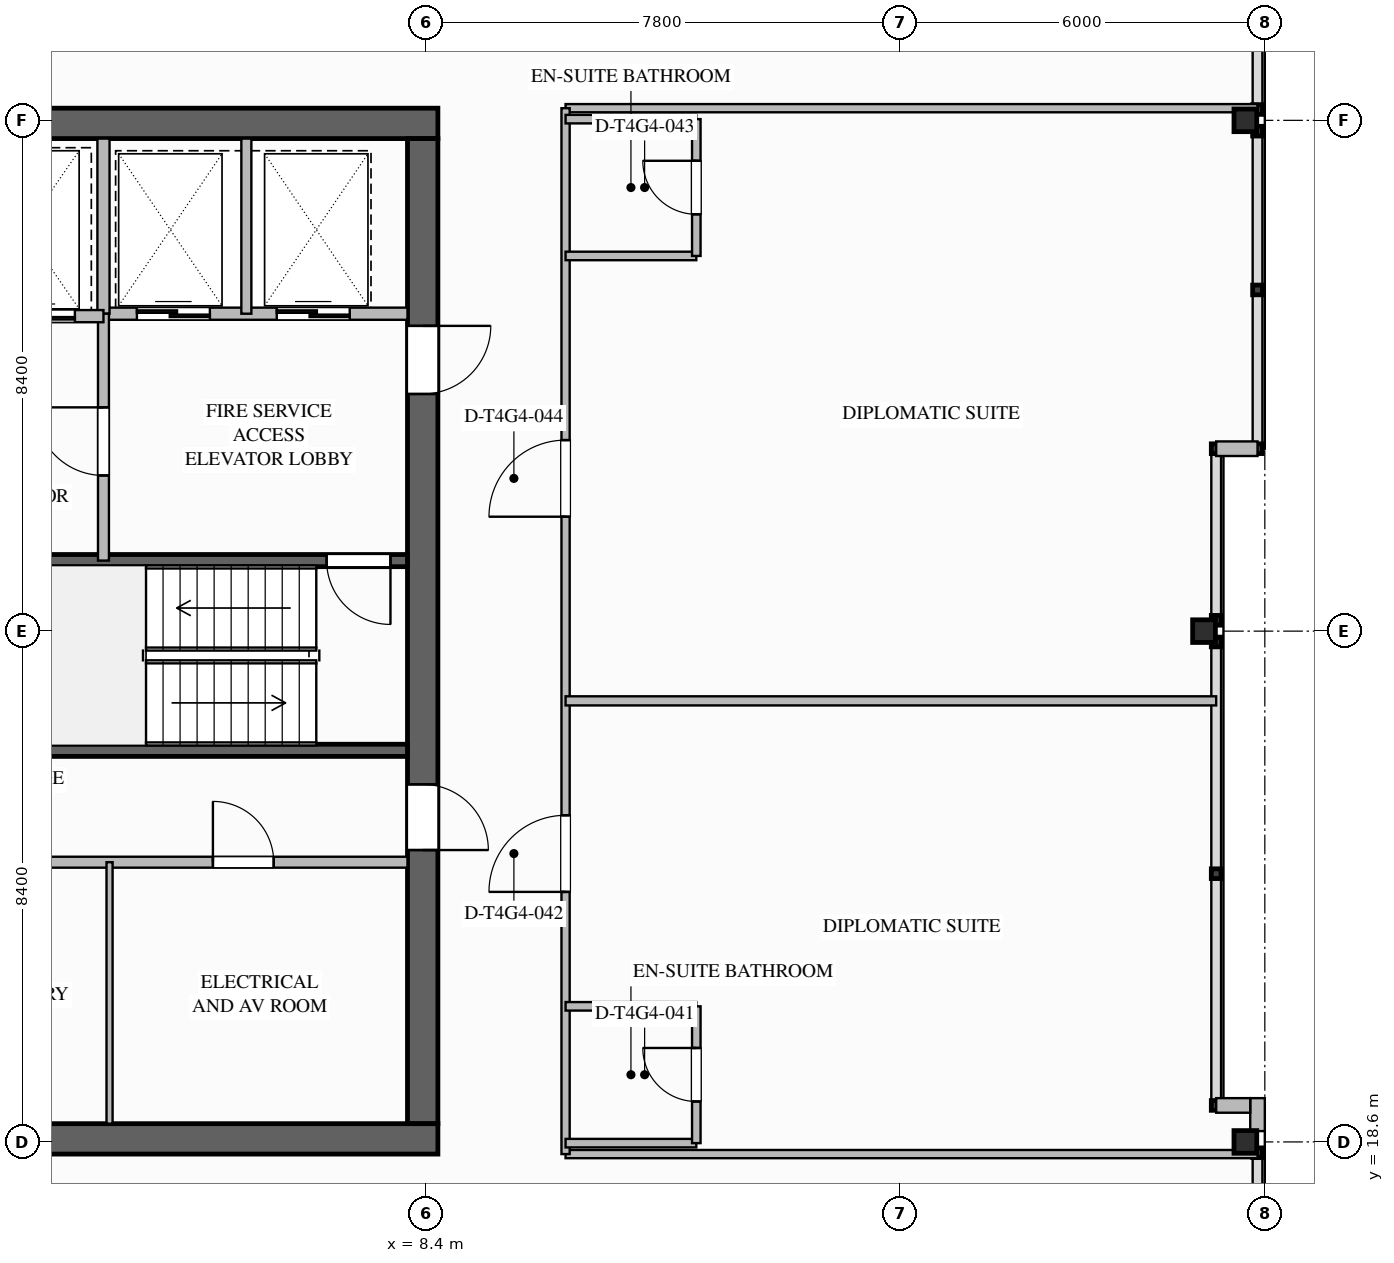
"""IFC4 building model, lengths in metres.
Left out: names, types, materials, properties, quantities, classifications, styles, units other than length and angle.
Written with IfcOpenShell. Run it as: python <this file> out.ifc"""

import sys

from ifc_helpers import new_model, si_unit, direction, frame, frame_2d, origin, origin_2d, place, context, subcontext, project, spatial, rectangle, i_section, extrude, element, fill, save


model = new_model("IFC4")
c1 = context("Model", 3, precision=1e-05, world=origin(), true_north=direction((0.0, 1.0)))
c2 = subcontext(c1, "Body", "Model", "MODEL_VIEW")
j1 = project(units=[si_unit("LENGTHUNIT", "METRE"), si_unit("PLANEANGLEUNIT", "RADIAN")], contexts=[c1])
p1 = place(None, origin())
s1 = spatial("IfcSite", under=j1, at=p1, CompositionType="ELEMENT")
p2 = place(p1, origin())
s2 = spatial("IfcBuilding", under=s1, at=p2, CompositionType="ELEMENT")
p3 = place(p2, frame((0.0, 0.0, 237.5)))
s3 = spatial("IfcBuildingStorey", under=s2, at=p3, CompositionType="ELEMENT", Elevation=237.5)
p4 = place(p3, frame((-8.6, 35.35, 0.0), z_axis=(0.0, 0.0, 1.0), x_axis=(1.0, 0.0, 0.0)))
e1 = element("IfcWall", 1, at=p4, inside=s3, PredefinedType="SHEAR", context=c2, shape_type="SweptSolid", body=[
    extrude(rectangle(XDim=17.2, YDim=0.5, at=frame_2d((8.6, 0.0))), origin(), (0.0, 0.0, 1.0), 3.6),
])
p5 = place(p3, frame((8.35, 35.1, 0.0), z_axis=(0.0, 0.0, 1.0), x_axis=(0.0, -1.0, 0.0)))
e2 = element("IfcWall", 2, at=p5, inside=s3, PredefinedType="SHEAR", context=c2, shape_type="SweptSolid", body=[
    extrude(rectangle(XDim=16.2, YDim=0.5, at=frame_2d((8.1, 0.0))), origin(), (0.0, 0.0, 1.0), 3.6),
])
p6 = place(p5, frame((3.08, 0.0, 0.0)))
e3 = element("IfcOpeningElement", 3, at=p6, cuts=e2, PredefinedType="OPENING", context=c2, shape_type="SweptSolid", body=[
    extrude(rectangle(XDim=1.12, YDim=2.1, at=frame_2d((0.56, 1.05))), frame((0.0, 0.26, 0.0), z_axis=(0.0, -1.0, 0.0), x_axis=(1.0, 0.0, 0.0)), (0.0, 0.0, 1.0), 0.52),
])
p7 = place(p5, frame((10.62, 0.0, 0.0)))
e4 = element("IfcOpeningElement", 4, at=p7, cuts=e2, PredefinedType="OPENING", context=c2, shape_type="SweptSolid", body=[
    extrude(rectangle(XDim=1.08, YDim=2.04, at=frame_2d((0.54, 1.02))), frame((0.0, 0.26, 0.0), z_axis=(0.0, -1.0, 0.0), x_axis=(1.0, 0.0, 0.0)), (0.0, 0.0, 1.0), 0.52),
])
p8 = place(p3, frame((8.6, 18.65, 0.0), z_axis=(0.0, 0.0, 1.0), x_axis=(-1.0, 0.0, 0.0)))
e5 = element("IfcWall", 5, at=p8, inside=s3, PredefinedType="SHEAR", context=c2, shape_type="SweptSolid", body=[
    extrude(rectangle(XDim=17.2, YDim=0.5, at=frame_2d((8.6, 0.0))), origin(), (0.0, 0.0, 1.0), 3.6),
])
for number, where, z_axis, x_axis in (
    (6, (21.88, 18.6, 0.0), (0.0, 0.0, 1.0), (1.0, 0.0, 0.0)),
    (7, (21.2, 27.0, 0.0), (0.0, 0.0, 1.0), (1.0, 0.0, 0.0)),
    (8, (21.88, 35.4, 0.0), (0.0, 0.0, 1.0), (1.0, 0.0, 0.0)),
):
    element("IfcColumn", number, at=place(p3, frame(where, z_axis=z_axis, x_axis=x_axis)), inside=s3, PredefinedType="COLUMN", context=c2, shape_type="SweptSolid", body=[
        extrude(i_section(OverallWidth=0.374, OverallDepth=0.372, WebThickness=0.016, FlangeThickness=0.026, FilletRadius=0.025, at=origin_2d()), origin(), (0.0, 0.0, 1.0), 3.597),
    ])
p9 = place(p3, frame((22.08, 19.32, 0.0), z_axis=(0.0, 0.0, 1.0), x_axis=(0.0, -1.0, 0.0)))
e9 = element("IfcWall", 9, at=p9, inside=s3, PredefinedType="STANDARD", context=c2, shape_type="SweptSolid", body=[
    extrude(rectangle(XDim=0.542, YDim=0.24, at=frame_2d((0.271, 0.0))), origin(), (0.0, 0.0, 1.0), 3.34),
])
p10 = place(p3, frame((22.08, 30.0, 0.0), z_axis=(0.0, 0.0, 1.0), x_axis=(-1.0, 0.0, 0.0)))
e10 = element("IfcWall", 10, at=p10, inside=s3, PredefinedType="STANDARD", context=c2, shape_type="SweptSolid", body=[
    extrude(rectangle(XDim=0.68, YDim=0.24, at=frame_2d((0.34, 0.0))), origin(), (0.0, 0.0, 1.0), 3.34),
])
p11 = place(p3, frame((21.4, 19.2, 0.0), z_axis=(0.0, 0.0, 1.0), x_axis=(1.0, 0.0, 0.0)))
e11 = element("IfcWall", 11, at=p11, inside=s3, PredefinedType="STANDARD", context=c2, shape_type="SweptSolid", body=[
    extrude(rectangle(XDim=0.56, YDim=0.24, at=frame_2d((0.28, 0.0))), origin(), (0.0, 0.0, 1.0), 3.34),
])
p12 = place(p3, frame((0.0, 25.04, 0.0), z_axis=(0.0, 0.0, 1.0), x_axis=(1.0, 0.0, 0.0)))
e12 = element("IfcWall", 12, at=p12, inside=s3, PredefinedType="SOLIDWALL", context=c2, shape_type="SweptSolid", body=[
    extrude(rectangle(XDim=8.1, YDim=0.2, at=frame_2d((4.05, 0.0))), origin(), (0.0, 0.0, 1.0), 3.34),
])
p13 = place(p3, frame((8.1, 28.16, 0.0), z_axis=(0.0, 0.0, 1.0), x_axis=(-1.0, 0.0, 0.0)))
e13 = element("IfcWall", 13, at=p13, inside=s3, PredefinedType="SOLIDWALL", context=c2, shape_type="SweptSolid", body=[
    extrude(rectangle(XDim=8.1, YDim=0.2, at=frame_2d((4.05, 0.0))), origin(), (0.0, 0.0, 1.0), 3.34),
])
p14 = place(p13, frame((0.28, 0.0, 0.0)))
e14 = element("IfcOpeningElement", 14, at=p14, cuts=e13, PredefinedType="OPENING", context=c2, shape_type="SweptSolid", body=[
    extrude(rectangle(XDim=1.05, YDim=2.1, at=frame_2d((0.525, 1.05))), frame((0.0, 0.11, 0.0), z_axis=(0.0, -1.0, 0.0), x_axis=(1.0, 0.0, 0.0)), (0.0, 0.0, 1.0), 0.22),
])
p15 = place(p3, frame((3.1, 32.22, 0.0), z_axis=(0.0, 0.0, 1.0), x_axis=(1.0, 0.0, 0.0)))
e15 = element("IfcWall", 15, at=p15, inside=s3, PredefinedType="SOLIDWALL", context=c2, shape_type="SweptSolid", body=[
    extrude(rectangle(XDim=5.0, YDim=0.2, at=frame_2d((2.5, 0.0))), origin(), (0.0, 0.0, 1.0), 3.34),
])
p16 = place(p15, frame((0.55, 0.0, 0.0)))
e16 = element("IfcOpeningElement", 16, at=p16, cuts=e15, PredefinedType="OPENING", context=c2, shape_type="SweptSolid", body=[
    extrude(rectangle(XDim=1.2, YDim=2.2, at=frame_2d((0.6, 1.1))), frame((0.0, 0.11, 0.0), z_axis=(0.0, -1.0, 0.0), x_axis=(1.0, 0.0, 0.0)), (0.0, 0.0, 1.0), 0.22),
])
p17 = place(p15, frame((2.85, 0.0, 0.0)))
e17 = element("IfcOpeningElement", 17, at=p17, cuts=e15, PredefinedType="OPENING", context=c2, shape_type="SweptSolid", body=[
    extrude(rectangle(XDim=1.2, YDim=2.2, at=frame_2d((0.6, 1.1))), frame((0.0, 0.11, 0.0), z_axis=(0.0, -1.0, 0.0), x_axis=(1.0, 0.0, 0.0)), (0.0, 0.0, 1.0), 0.22),
])
p18 = place(p3, frame((3.1, 32.22, 0.0), z_axis=(0.0, 0.0, 1.0), x_axis=(0.0, 1.0, 0.0)))
e18 = element("IfcWall", 18, at=p18, inside=s3, PredefinedType="SOLIDWALL", context=c2, shape_type="SweptSolid", body=[
    extrude(rectangle(XDim=2.88, YDim=0.2, at=frame_2d((1.44, 0.0))), origin(), (0.0, 0.0, 1.0), 3.34),
])
p19 = place(p3, frame((5.45, 32.22, 0.0), z_axis=(0.0, 0.0, 1.0), x_axis=(0.0, 1.0, 0.0)))
e19 = element("IfcWall", 19, at=p19, inside=s3, PredefinedType="PARTITIONING", context=c2, shape_type="SweptSolid", body=[
    extrude(rectangle(XDim=2.88, YDim=0.165, at=frame_2d((1.44, 0.0))), origin(), (0.0, 0.0, 1.0), 3.34),
])
p20 = place(p3, frame((3.1, 28.16, 0.0), z_axis=(0.0, 0.0, 1.0), x_axis=(0.0, 1.0, 0.0)))
e20 = element("IfcWall", 20, at=p20, inside=s3, PredefinedType="SOLIDWALL", context=c2, shape_type="SweptSolid", body=[
    extrude(rectangle(XDim=4.06, YDim=0.18, at=frame_2d((2.03, 0.0))), origin(), (0.0, 0.0, 1.0), 3.34),
])
p21 = place(p20, frame((1.4, 0.0, 0.0)))
e21 = element("IfcOpeningElement", 21, at=p21, cuts=e20, PredefinedType="OPENING", context=c2, shape_type="SweptSolid", body=[
    extrude(rectangle(XDim=1.12, YDim=2.1, at=frame_2d((0.56, 1.05))), frame((0.0, 0.1, 0.0), z_axis=(0.0, -1.0, 0.0), x_axis=(1.0, 0.0, 0.0)), (0.0, 0.0, 1.0), 0.2),
])
p22 = place(p3, frame((-1.0, 32.18, 0.0), z_axis=(0.0, 0.0, 1.0), x_axis=(1.0, 0.0, 0.0)))
e22 = element("IfcWall", 22, at=p22, inside=s3, PredefinedType="SOLIDWALL", context=c2, shape_type="SweptSolid", body=[
    extrude(rectangle(XDim=4.1, YDim=0.2, at=frame_2d((2.05, 0.0))), origin(), (0.0, 0.0, 1.0), 3.34),
])
p23 = place(p22, frame((0.37, 0.0, 0.0)))
e23 = element("IfcOpeningElement", 23, at=p23, cuts=e22, PredefinedType="OPENING", context=c2, shape_type="SweptSolid", body=[
    extrude(rectangle(XDim=1.3, YDim=2.2, at=frame_2d((0.65, 1.1))), frame((0.0, 0.11, 0.0), z_axis=(0.0, -1.0, 0.0), x_axis=(1.0, 0.0, 0.0)), (0.0, 0.0, 1.0), 0.22),
])
p24 = place(p22, frame((2.33, 0.0, 0.0)))
e24 = element("IfcOpeningElement", 24, at=p24, cuts=e22, PredefinedType="OPENING", context=c2, shape_type="SweptSolid", body=[
    extrude(rectangle(XDim=1.3, YDim=2.2, at=frame_2d((0.65, 1.1))), frame((0.0, 0.11, 0.0), z_axis=(0.0, -1.0, 0.0), x_axis=(1.0, 0.0, 0.0)), (0.0, 0.0, 1.0), 0.22),
])
p25 = place(p3, frame((-8.1, 23.2, 0.0), z_axis=(0.0, 0.0, 1.0), x_axis=(1.0, 0.0, 0.0)))
e25 = element("IfcWall", 25, at=p25, inside=s3, PredefinedType="SOLIDWALL", context=c2, shape_type="SweptSolid", body=[
    extrude(rectangle(XDim=16.2, YDim=0.18, at=frame_2d((8.1, 0.0))), origin(), (0.0, 0.0, 1.0), 3.34),
])
p26 = place(p25, frame((1.8, 0.0, 0.0)))
e26 = element("IfcOpeningElement", 26, at=p26, cuts=e25, PredefinedType="OPENING", context=c2, shape_type="SweptSolid", body=[
    extrude(rectangle(XDim=1.0, YDim=2.1, at=frame_2d((0.5, 1.05))), frame((0.0, 0.1, 0.0), z_axis=(0.0, -1.0, 0.0), x_axis=(1.0, 0.0, 0.0)), (0.0, 0.0, 1.0), 0.2),
])
p27 = place(p25, frame((7.6, 0.0, 0.0)))
e27 = element("IfcOpeningElement", 27, at=p27, cuts=e25, PredefinedType="OPENING", context=c2, shape_type="SweptSolid", body=[
    extrude(rectangle(XDim=1.0, YDim=2.1, at=frame_2d((0.5, 1.05))), frame((0.0, 0.1, 0.0), z_axis=(0.0, -1.0, 0.0), x_axis=(1.0, 0.0, 0.0)), (0.0, 0.0, 1.0), 0.2),
])
p28 = place(p25, frame((13.0, 0.0, 0.0)))
e28 = element("IfcOpeningElement", 28, at=p28, cuts=e25, PredefinedType="OPENING", context=c2, shape_type="SweptSolid", body=[
    extrude(rectangle(XDim=1.0, YDim=2.1, at=frame_2d((0.5, 1.05))), frame((0.0, 0.1, 0.0), z_axis=(0.0, -1.0, 0.0), x_axis=(1.0, 0.0, 0.0)), (0.0, 0.0, 1.0), 0.2),
])
p29 = place(p3, frame((3.2, 18.9, 0.0), z_axis=(0.0, 0.0, 1.0), x_axis=(0.0, 1.0, 0.0)))
e29 = element("IfcWall", 29, at=p29, inside=s3, PredefinedType="PARTITIONING", context=c2, shape_type="SweptSolid", body=[
    extrude(rectangle(XDim=4.3, YDim=0.1, at=frame_2d((2.15, 0.0))), origin(), (0.0, 0.0, 1.0), 3.34),
])
for number, where, z_axis, x_axis in (
    (30, (10.7, 18.4, 0.0), (0.0, 0.0, 1.0), (1.0, 0.0, 0.0)),
    (31, (10.7, 35.6, 0.0), (0.0, 0.0, 1.0), (1.0, 0.0, 0.0)),
):
    element("IfcWall", number, at=place(p3, frame(where, z_axis=z_axis, x_axis=x_axis)), inside=s3, PredefinedType="PARTITIONING", context=c2, shape_type="SweptSolid", body=[
        extrude(rectangle(XDim=11.38, YDim=0.135, at=frame_2d((5.69, 0.0))), origin(), (0.0, 0.0, 1.0), 2.717),
    ])
p30 = place(p3, frame((10.7, 18.4, 0.0), z_axis=(0.0, 0.0, 1.0), x_axis=(0.0, 1.0, 0.0)))
e32 = element("IfcWall", 32, at=p30, inside=s3, PredefinedType="PARTITIONING", context=c2, shape_type="SweptSolid", body=[
    extrude(rectangle(XDim=17.2, YDim=0.135, at=frame_2d((8.6, 0.0))), origin(), (0.0, 0.0, 1.0), 3.34),
])
p31 = place(p30, frame((4.312, 0.0, 0.0)))
e33 = element("IfcOpeningElement", 33, at=p31, cuts=e32, PredefinedType="OPENING", context=c2, shape_type="SweptSolid", body=[
    extrude(rectangle(XDim=1.26, YDim=2.2, at=frame_2d((0.63, 1.1))), frame((0.0, 0.077, 0.0), z_axis=(0.0, -1.0, 0.0), x_axis=(1.0, 0.0, 0.0)), (0.0, 0.0, 1.0), 0.155),
])
p32 = place(p30, frame((10.482, 0.0, 0.0)))
e34 = element("IfcOpeningElement", 34, at=p32, cuts=e32, PredefinedType="OPENING", context=c2, shape_type="SweptSolid", body=[
    extrude(rectangle(XDim=1.26, YDim=2.2, at=frame_2d((0.63, 1.1))), frame((0.0, 0.077, 0.0), z_axis=(0.0, -1.0, 0.0), x_axis=(1.0, 0.0, 0.0)), (0.0, 0.0, 1.0), 0.155),
])
p33 = place(p3, frame((10.7, 18.58, 0.0), z_axis=(0.0, 0.0, 1.0), x_axis=(1.0, 0.0, 0.0)))
e35 = element("IfcWall", 35, at=p33, inside=s3, PredefinedType="PLUMBINGWALL", context=c2, shape_type="SweptSolid", body=[
    extrude(rectangle(XDim=2.15, YDim=0.14, at=frame_2d((1.075, 0.0))), origin(), (0.0, 0.0, 1.0), 2.717),
])
p34 = place(p3, frame((10.7, 20.83, 0.0), z_axis=(0.0, 0.0, 1.0), x_axis=(1.0, 0.0, 0.0)))
e36 = element("IfcWall", 36, at=p34, inside=s3, PredefinedType="PLUMBINGWALL", context=c2, shape_type="SweptSolid", body=[
    extrude(rectangle(XDim=2.15, YDim=0.14, at=frame_2d((1.075, 0.0))), origin(), (0.0, 0.0, 1.0), 3.34),
])
p35 = place(p3, frame((12.85, 18.58, 0.0), z_axis=(0.0, 0.0, 1.0), x_axis=(0.0, 1.0, 0.0)))
e37 = element("IfcWall", 37, at=p35, inside=s3, PredefinedType="PLUMBINGWALL", context=c2, shape_type="SweptSolid", body=[
    extrude(rectangle(XDim=2.25, YDim=0.14, at=frame_2d((1.125, 0.0))), origin(), (0.0, 0.0, 1.0), 3.34),
])
p36 = place(p35, frame((0.685, 0.0, 0.0)))
e38 = element("IfcOpeningElement", 38, at=p36, cuts=e37, PredefinedType="OPENING", context=c2, shape_type="SweptSolid", body=[
    extrude(rectangle(XDim=0.88, YDim=2.1, at=frame_2d((0.44, 1.05))), frame((0.0, 0.08, 0.0), z_axis=(0.0, -1.0, 0.0), x_axis=(1.0, 0.0, 0.0)), (0.0, 0.0, 1.0), 0.16),
])
p37 = place(p3, frame((10.7, 25.853, 0.0), z_axis=(0.0, 0.0, 1.0), x_axis=(1.0, 0.0, 0.0)))
e39 = element("IfcWall", 39, at=p37, inside=s3, PredefinedType="PARTITIONING", context=c2, shape_type="SweptSolid", body=[
    extrude(rectangle(XDim=10.7, YDim=0.15, at=frame_2d((5.35, 0.0))), origin(), (0.0, 0.0, 1.0), 3.34),
])
p38 = place(p3, frame((10.7, 33.17, 0.0), z_axis=(0.0, 0.0, 1.0), x_axis=(1.0, 0.0, 0.0)))
e40 = element("IfcWall", 40, at=p38, inside=s3, PredefinedType="PLUMBINGWALL", context=c2, shape_type="SweptSolid", body=[
    extrude(rectangle(XDim=2.15, YDim=0.14, at=frame_2d((1.075, 0.0))), origin(), (0.0, 0.0, 1.0), 3.34),
])
p39 = place(p3, frame((10.7, 35.42, 0.0), z_axis=(0.0, 0.0, 1.0), x_axis=(1.0, 0.0, 0.0)))
e41 = element("IfcWall", 41, at=p39, inside=s3, PredefinedType="PLUMBINGWALL", context=c2, shape_type="SweptSolid", body=[
    extrude(rectangle(XDim=2.15, YDim=0.14, at=frame_2d((1.075, 0.0))), origin(), (0.0, 0.0, 1.0), 2.717),
])
p40 = place(p3, frame((12.85, 33.17, 0.0), z_axis=(0.0, 0.0, 1.0), x_axis=(0.0, 1.0, 0.0)))
e42 = element("IfcWall", 42, at=p40, inside=s3, PredefinedType="PLUMBINGWALL", context=c2, shape_type="SweptSolid", body=[
    extrude(rectangle(XDim=2.25, YDim=0.14, at=frame_2d((1.125, 0.0))), origin(), (0.0, 0.0, 1.0), 3.34),
])
p41 = place(p40, frame((0.685, 0.0, 0.0)))
e43 = element("IfcOpeningElement", 43, at=p41, cuts=e42, PredefinedType="OPENING", context=c2, shape_type="SweptSolid", body=[
    extrude(rectangle(XDim=0.88, YDim=2.1, at=frame_2d((0.44, 1.05))), frame((0.0, 0.08, 0.0), z_axis=(0.0, -1.0, 0.0), x_axis=(1.0, 0.0, 0.0)), (0.0, 0.0, 1.0), 0.16),
])
p42 = place(p14, origin())
e44 = element("IfcDoor", 44, at=p42, inside=s3, OperationType="SINGLE_SWING_LEFT", PredefinedType="DOOR", context=c2, shape_type="SweptSolid", body=[
    extrude(rectangle(XDim=1.05, YDim=2.1, at=frame_2d((0.525, 1.05))), frame((0.0, 0.025, 0.0), z_axis=(0.0, -1.0, 0.0), x_axis=(1.0, 0.0, 0.0)), (0.0, 0.0, 1.0), 0.05),
])
fill(e14, e44)
p43 = place(p16, origin())
e45 = element("IfcDoor", 45, at=p43, inside=s3, OperationType="SLIDING_TO_LEFT", PredefinedType="DOOR", context=c2, shape_type="SweptSolid", body=[
    extrude(rectangle(XDim=1.2, YDim=2.2, at=frame_2d((0.6, 1.1))), frame((0.0, 0.025, 0.0), z_axis=(0.0, -1.0, 0.0), x_axis=(1.0, 0.0, 0.0)), (0.0, 0.0, 1.0), 0.05),
])
fill(e16, e45)
p44 = place(p17, origin())
e46 = element("IfcDoor", 46, at=p44, inside=s3, OperationType="SLIDING_TO_LEFT", PredefinedType="DOOR", context=c2, shape_type="SweptSolid", body=[
    extrude(rectangle(XDim=1.2, YDim=2.2, at=frame_2d((0.6, 1.1))), frame((0.0, 0.025, 0.0), z_axis=(0.0, -1.0, 0.0), x_axis=(1.0, 0.0, 0.0)), (0.0, 0.0, 1.0), 0.05),
])
fill(e17, e46)
p45 = place(p21, origin())
e47 = element("IfcDoor", 47, at=p45, inside=s3, OperationType="SINGLE_SWING_RIGHT", PredefinedType="DOOR", context=c2, shape_type="SweptSolid", body=[
    extrude(rectangle(XDim=1.12, YDim=2.1, at=frame_2d((0.56, 1.05))), frame((0.0, 0.025, 0.0), z_axis=(0.0, -1.0, 0.0), x_axis=(1.0, 0.0, 0.0)), (0.0, 0.0, 1.0), 0.05),
])
fill(e21, e47)
p46 = place(p6, origin())
e48 = element("IfcDoor", 48, at=p46, inside=s3, OperationType="SINGLE_SWING_LEFT", PredefinedType="DOOR", context=c2, shape_type="SweptSolid", body=[
    extrude(rectangle(XDim=1.12, YDim=2.1, at=frame_2d((0.56, 1.05))), frame((0.0, 0.025, 0.0), z_axis=(0.0, -1.0, 0.0), x_axis=(1.0, 0.0, 0.0)), (0.0, 0.0, 1.0), 0.05),
])
fill(e3, e48)
p47 = place(p24, origin())
e49 = element("IfcDoor", 49, at=p47, inside=s3, OperationType="SLIDING_TO_LEFT", PredefinedType="DOOR", context=c2, shape_type="SweptSolid", body=[
    extrude(rectangle(XDim=1.3, YDim=2.2, at=frame_2d((0.65, 1.1))), frame((0.0, 0.025, 0.0), z_axis=(0.0, -1.0, 0.0), x_axis=(1.0, 0.0, 0.0)), (0.0, 0.0, 1.0), 0.05),
])
fill(e24, e49)
p48 = place(p7, origin())
e50 = element("IfcDoor", 50, at=p48, inside=s3, OperationType="SINGLE_SWING_RIGHT", PredefinedType="DOOR", context=c2, shape_type="SweptSolid", body=[
    extrude(rectangle(XDim=1.08, YDim=2.04, at=frame_2d((0.54, 1.02))), frame((0.0, 0.025, 0.0), z_axis=(0.0, -1.0, 0.0), x_axis=(1.0, 0.0, 0.0)), (0.0, 0.0, 1.0), 0.05),
])
fill(e4, e50)
p49 = place(p28, origin())
e51 = element("IfcDoor", 51, at=p49, inside=s3, OperationType="SINGLE_SWING_LEFT", PredefinedType="DOOR", context=c2, shape_type="SweptSolid", body=[
    extrude(rectangle(XDim=1.0, YDim=2.1, at=frame_2d((0.5, 1.05))), frame((0.0, 0.025, 0.0), z_axis=(0.0, -1.0, 0.0), x_axis=(1.0, 0.0, 0.0)), (0.0, 0.0, 1.0), 0.05),
])
fill(e28, e51)
p50 = place(p36, origin())
e52 = element("IfcDoor", 52, at=p50, inside=s3, OperationType="SINGLE_SWING_RIGHT", PredefinedType="DOOR", context=c2, shape_type="SweptSolid", body=[
    extrude(rectangle(XDim=0.88, YDim=2.1, at=frame_2d((0.44, 1.05))), frame((0.0, 0.025, 0.0), z_axis=(0.0, -1.0, 0.0), x_axis=(1.0, 0.0, 0.0)), (0.0, 0.0, 1.0), 0.05),
])
fill(e38, e52)
p51 = place(p31, origin())
e53 = element("IfcDoor", 53, at=p51, inside=s3, OperationType="SINGLE_SWING_LEFT", PredefinedType="DOOR", context=c2, shape_type="SweptSolid", body=[
    extrude(rectangle(XDim=1.26, YDim=2.2, at=frame_2d((0.63, 1.1))), frame((0.0, 0.025, 0.0), z_axis=(0.0, -1.0, 0.0), x_axis=(1.0, 0.0, 0.0)), (0.0, 0.0, 1.0), 0.05),
])
fill(e33, e53)
p52 = place(p41, origin())
e54 = element("IfcDoor", 54, at=p52, inside=s3, OperationType="SINGLE_SWING_RIGHT", PredefinedType="DOOR", context=c2, shape_type="SweptSolid", body=[
    extrude(rectangle(XDim=0.88, YDim=2.1, at=frame_2d((0.44, 1.05))), frame((0.0, 0.025, 0.0), z_axis=(0.0, -1.0, 0.0), x_axis=(1.0, 0.0, 0.0)), (0.0, 0.0, 1.0), 0.05),
])
fill(e43, e54)
p53 = place(p32, origin())
e55 = element("IfcDoor", 55, at=p53, inside=s3, OperationType="SINGLE_SWING_LEFT", PredefinedType="DOOR", context=c2, shape_type="SweptSolid", body=[
    extrude(rectangle(XDim=1.26, YDim=2.2, at=frame_2d((0.63, 1.1))), frame((0.0, 0.025, 0.0), z_axis=(0.0, -1.0, 0.0), x_axis=(1.0, 0.0, 0.0)), (0.0, 0.0, 1.0), 0.05),
])
fill(e34, e55)
save(model, sys.argv[1])
